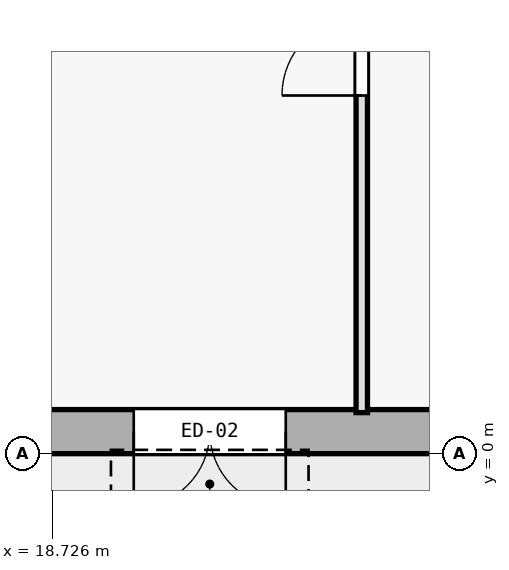
"""IFC4 building model, lengths in metres.
Left out: names, types, materials, properties, quantities, classifications, styles, units other than length and angle.
Written with IfcOpenShell. Run it as: python <this file> out.ifc"""

import sys

from ifc_helpers import new_model, si_unit, direction, frame, frame_2d, origin, place, context, subcontext, project, spatial, rectangle, extrude, element, fill, save


model = new_model("IFC4")
c1 = context("Model", 3, precision=1e-05, world=origin(), true_north=direction((0.0, 1.0)))
c2 = subcontext(c1, "Body", "Model", "MODEL_VIEW")
j1 = project(units=[si_unit("LENGTHUNIT", "METRE"), si_unit("PLANEANGLEUNIT", "RADIAN")], contexts=[c1])
p1 = place(None, origin())
s1 = spatial("IfcSite", under=j1, at=p1, CompositionType="ELEMENT")
p2 = place(p1, origin())
s2 = spatial("IfcBuilding", under=s1, at=p2, CompositionType="ELEMENT")
p3 = place(p2, origin())
s3 = spatial("IfcBuildingStorey", under=s2, at=p3, CompositionType="ELEMENT", Elevation=0.0)
p4 = place(p3, frame((24.8, 0.29, 0.0), z_axis=(0.0, 0.0, 1.0), x_axis=(-1.0, 0.0, 0.0)))
e1 = element("IfcWall", 1, at=p4, inside=s3, PredefinedType="STANDARD", context=c2, shape_type="SweptSolid", body=[
    extrude(rectangle(XDim=8.0, YDim=0.58, at=frame_2d((4.0, 0.0))), origin(), (0.0, 0.0, 1.0), 5.14),
])
p5 = place(p4, frame((3.0, 0.0, 0.0)))
e2 = element("IfcOpeningElement", 2, at=p5, cuts=e1, PredefinedType="OPENING", context=c2, shape_type="SweptSolid", body=[
    extrude(rectangle(XDim=2.0, YDim=2.35, at=frame_2d((1.0, 1.175))), frame((0.0, 0.3, 0.0), z_axis=(0.0, -1.0, 0.0), x_axis=(1.0, 0.0, 0.0)), (0.0, 0.0, 1.0), 0.6),
])
p6 = place(p3, frame((22.8, 0.54, 0.0), z_axis=(0.0, 0.0, 1.0), x_axis=(0.0, 1.0, 0.0)))
e3 = element("IfcWall", 3, at=p6, inside=s3, PredefinedType="PARTITIONING", context=c2, shape_type="SweptSolid", body=[
    extrude(rectangle(XDim=14.92, YDim=0.15, at=frame_2d((7.46, 0.0))), origin(), (0.0, 0.0, 1.0), 4.27),
])
p7 = place(p6, frame((4.172, 0.0, 0.0)))
e4 = element("IfcOpeningElement", 4, at=p7, cuts=e3, PredefinedType="OPENING", context=c2, shape_type="SweptSolid", body=[
    extrude(rectangle(XDim=2.1, YDim=2.4, at=frame_2d((1.05, 1.2))), frame((0.0, 0.085, 0.0), z_axis=(0.0, -1.0, 0.0), x_axis=(1.0, 0.0, 0.0)), (0.0, 0.0, 1.0), 0.17),
])
p8 = place(p5, origin())
e5 = element("IfcDoor", 5, at=p8, inside=s3, OperationType="DOUBLE_DOOR_SINGLE_SWING", PredefinedType="DOOR", context=c2, shape_type="SweptSolid", body=[
    extrude(rectangle(XDim=2.0, YDim=2.35, at=frame_2d((1.0, 1.175))), frame((0.0, 0.025, 0.0), z_axis=(0.0, -1.0, 0.0), x_axis=(1.0, 0.0, 0.0)), (0.0, 0.0, 1.0), 0.05),
])
fill(e2, e5)
p9 = place(p7, origin())
e6 = element("IfcDoor", 6, at=p9, inside=s3, OperationType="DOUBLE_DOOR_SINGLE_SWING", PredefinedType="DOOR", context=c2, shape_type="SweptSolid", body=[
    extrude(rectangle(XDim=2.1, YDim=2.4, at=frame_2d((1.05, 1.2))), frame((0.0, 0.025, 0.0), z_axis=(0.0, -1.0, 0.0), x_axis=(1.0, 0.0, 0.0)), (0.0, 0.0, 1.0), 0.05),
])
fill(e4, e6)
save(model, sys.argv[1])
